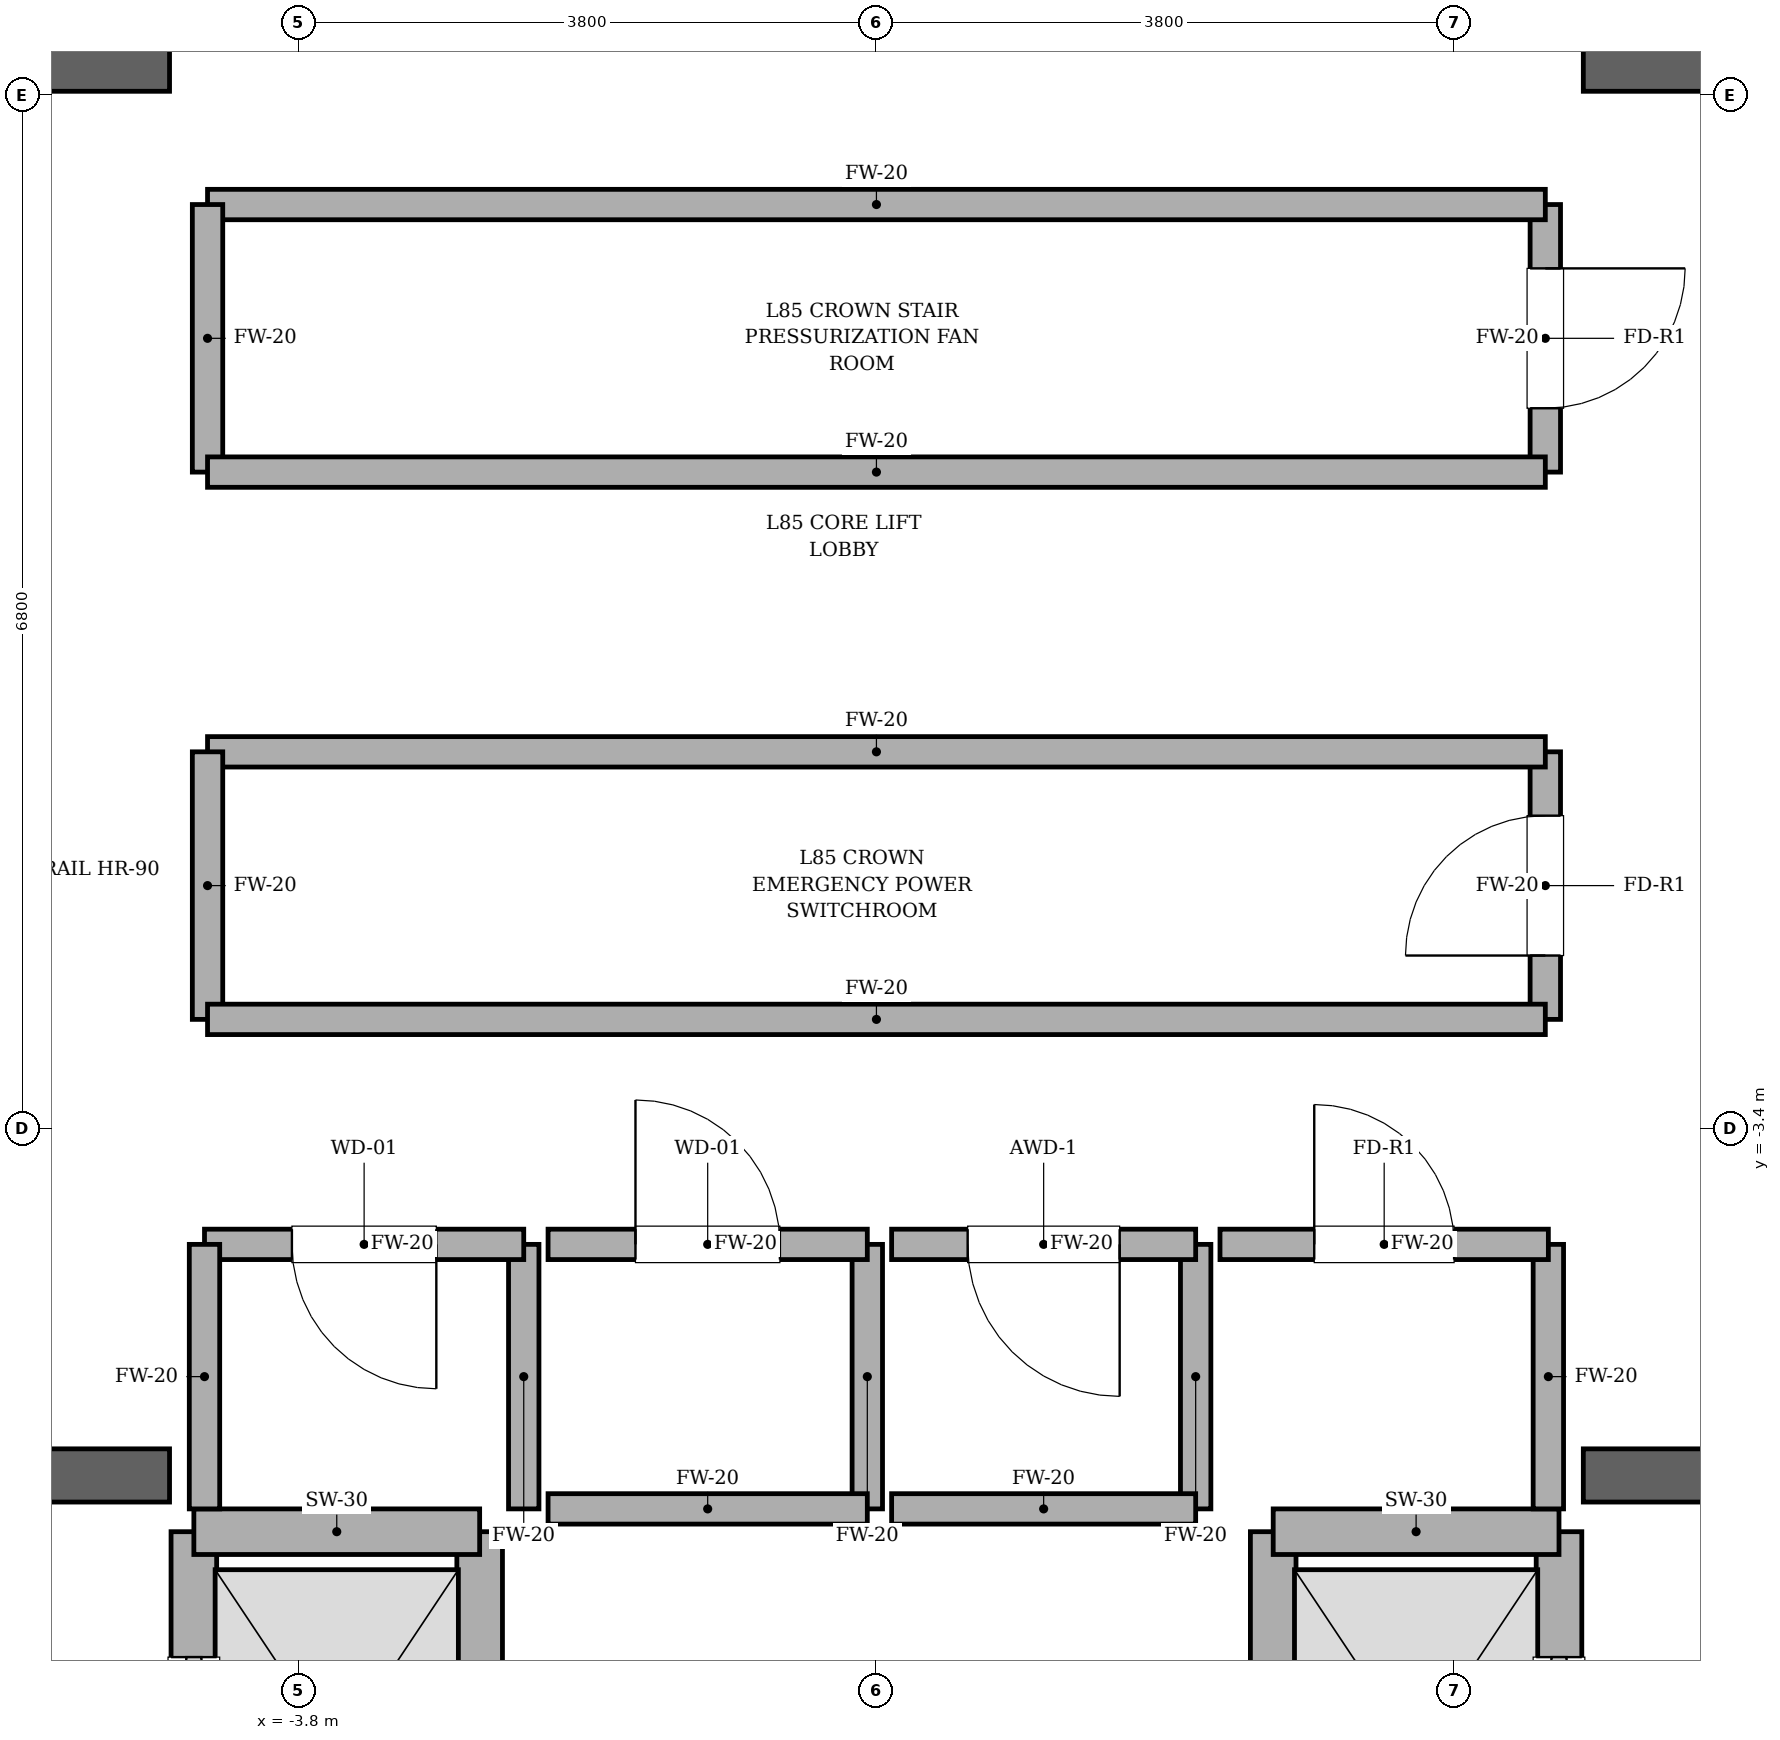
"""IFC4 building model, lengths in metres.
Left out: names, types, materials, properties, quantities, classifications, styles, units other than length and angle.
Written with IfcOpenShell. Run it as: python <this file> out.ifc"""

import sys

from ifc_helpers import new_model, si_unit, direction, frame, frame_2d, origin, place, context, subcontext, project, spatial, rectangle, extrude, element, fill, save


model = new_model("IFC4")
c1 = context("Model", 3, precision=1e-05, world=origin(), true_north=direction((0.0, 1.0)))
c2 = subcontext(c1, "Body", "Model", "MODEL_VIEW")
j1 = project(units=[si_unit("LENGTHUNIT", "METRE"), si_unit("PLANEANGLEUNIT", "RADIAN")], contexts=[c1])
p1 = place(None, origin())
s1 = spatial("IfcSite", under=j1, at=p1, CompositionType="ELEMENT")
p2 = place(p1, origin())
s2 = spatial("IfcBuilding", under=s1, at=p2, CompositionType="ELEMENT")
p3 = place(p2, frame((0.0, 0.0, 361.8)))
s3 = spatial("IfcBuildingStorey", under=s2, at=p3, CompositionType="ELEMENT", Elevation=361.8)
p4 = place(p3, frame((-9.975, -5.68, 0.0), z_axis=(0.0, 0.0, 1.0), x_axis=(1.0, 0.0, 0.0)))
e1 = element("IfcWall", 1, at=p4, inside=s3, PredefinedType="SOLIDWALL", context=c2, shape_type="SweptSolid", body=[
    extrude(rectangle(XDim=5.325, YDim=0.35, at=frame_2d((2.663, 0.0))), origin(), (0.0, 0.0, 1.0), 4.5),
])
p5 = place(p4, frame((1.435, 0.0, 0.0)))
e2 = element("IfcOpeningElement", 2, at=p5, cuts=e1, PredefinedType="OPENING", context=c2, shape_type="SweptSolid", body=[
    extrude(rectangle(XDim=1.18, YDim=2.2, at=frame_2d((0.59, 1.1))), frame((0.0, 0.185, 0.0), z_axis=(0.0, -1.0, 0.0), x_axis=(1.0, 0.0, 0.0)), (0.0, 0.0, 1.0), 0.37),
])
p6 = place(p3, frame((4.65, -5.68, 0.0), z_axis=(0.0, 0.0, 1.0), x_axis=(1.0, 0.0, 0.0)))
e3 = element("IfcWall", 3, at=p6, inside=s3, PredefinedType="SOLIDWALL", context=c2, shape_type="SweptSolid", body=[
    extrude(rectangle(XDim=5.325, YDim=0.35, at=frame_2d((2.663, 0.0))), origin(), (0.0, 0.0, 1.0), 4.5),
])
p7 = place(p6, frame((2.71, 0.0, 0.0)))
e4 = element("IfcOpeningElement", 4, at=p7, cuts=e3, PredefinedType="OPENING", context=c2, shape_type="SweptSolid", body=[
    extrude(rectangle(XDim=1.18, YDim=2.2, at=frame_2d((0.59, 1.1))), frame((0.0, 0.185, 0.0), z_axis=(0.0, -1.0, 0.0), x_axis=(1.0, 0.0, 0.0)), (0.0, 0.0, 1.0), 0.37),
])
for number, where, z_axis, x_axis in (
    (5, (-9.975, 3.6, 0.0), (0.0, 0.0, 1.0), (1.0, 0.0, 0.0)),
    (6, (4.65, 3.6, 0.0), (0.0, 0.0, 1.0), (1.0, 0.0, 0.0)),
):
    element("IfcWall", number, at=place(p3, frame(where, z_axis=z_axis, x_axis=x_axis)), inside=s3, PredefinedType="SOLIDWALL", context=c2, shape_type="SweptSolid", body=[
        extrude(rectangle(XDim=5.325, YDim=0.35, at=frame_2d((2.663, 0.0))), origin(), (0.0, 0.0, 1.0), 4.5),
    ])
p8 = place(p3, frame((-4.49, -8.82, 0.0), z_axis=(0.0, 0.0, 1.0), x_axis=(0.0, 1.0, 0.0)))
e7 = element("IfcWall", 7, at=p8, inside=s3, PredefinedType="SOLIDWALL", context=c2, shape_type="SweptSolid", body=[
    extrude(rectangle(XDim=2.77, YDim=0.3, at=frame_2d((1.385, 0.0))), origin(), (0.0, 0.0, 1.0), 4.28),
])
p9 = place(p8, frame((0.825, 0.0, 0.0)))
e8 = element("IfcOpeningElement", 8, at=p9, cuts=e7, PredefinedType="OPENING", context=c2, shape_type="SweptSolid", body=[
    extrude(rectangle(XDim=1.12, YDim=2.25, at=frame_2d((0.56, 1.125))), frame((0.0, 0.16, 0.0), z_axis=(0.0, -1.0, 0.0), x_axis=(1.0, 0.0, 0.0)), (0.0, 0.0, 1.0), 0.32),
])
p10 = place(p3, frame((-2.61, -8.82, 0.0), z_axis=(0.0, 0.0, 1.0), x_axis=(0.0, 1.0, 0.0)))
e9 = element("IfcWall", 9, at=p10, inside=s3, PredefinedType="SOLIDWALL", context=c2, shape_type="SweptSolid", body=[
    extrude(rectangle(XDim=2.77, YDim=0.3, at=frame_2d((1.385, 0.0))), origin(), (0.0, 0.0, 1.0), 4.28),
])
p11 = place(p3, frame((-4.49, -6.05, 0.0), z_axis=(0.0, 0.0, 1.0), x_axis=(1.0, 0.0, 0.0)))
e10 = element("IfcWall", 10, at=p11, inside=s3, PredefinedType="SOLIDWALL", context=c2, shape_type="SweptSolid", body=[
    extrude(rectangle(XDim=1.88, YDim=0.3, at=frame_2d((0.94, 0.0))), origin(), (0.0, 0.0, 1.0), 4.28),
])
p12 = place(p3, frame((4.49, -8.82, 0.0), z_axis=(0.0, 0.0, 1.0), x_axis=(0.0, 1.0, 0.0)))
e11 = element("IfcWall", 11, at=p12, inside=s3, PredefinedType="SOLIDWALL", context=c2, shape_type="SweptSolid", body=[
    extrude(rectangle(XDim=2.77, YDim=0.3, at=frame_2d((1.385, 0.0))), origin(), (0.0, 0.0, 1.0), 4.28),
])
p13 = place(p12, frame((0.825, 0.0, 0.0)))
e12 = element("IfcOpeningElement", 12, at=p13, cuts=e11, PredefinedType="OPENING", context=c2, shape_type="SweptSolid", body=[
    extrude(rectangle(XDim=1.12, YDim=2.25, at=frame_2d((0.56, 1.125))), frame((0.0, 0.16, 0.0), z_axis=(0.0, -1.0, 0.0), x_axis=(1.0, 0.0, 0.0)), (0.0, 0.0, 1.0), 0.32),
])
p14 = place(p3, frame((2.61, -8.82, 0.0), z_axis=(0.0, 0.0, 1.0), x_axis=(0.0, 1.0, 0.0)))
e13 = element("IfcWall", 13, at=p14, inside=s3, PredefinedType="SOLIDWALL", context=c2, shape_type="SweptSolid", body=[
    extrude(rectangle(XDim=2.77, YDim=0.3, at=frame_2d((1.385, 0.0))), origin(), (0.0, 0.0, 1.0), 4.28),
])
p15 = place(p3, frame((2.61, -6.05, 0.0), z_axis=(0.0, 0.0, 1.0), x_axis=(1.0, 0.0, 0.0)))
e14 = element("IfcWall", 14, at=p15, inside=s3, PredefinedType="SOLIDWALL", context=c2, shape_type="SweptSolid", body=[
    extrude(rectangle(XDim=1.88, YDim=0.3, at=frame_2d((0.94, 0.0))), origin(), (0.0, 0.0, 1.0), 4.28),
])
p16 = place(p3, frame((-2.32, -5.9, 0.0), z_axis=(0.0, 0.0, 1.0), x_axis=(0.0, 1.0, 0.0)))
e15 = element("IfcWall", 15, at=p16, inside=s3, PredefinedType="SOLIDWALL", context=c2, shape_type="SweptSolid", body=[
    extrude(rectangle(XDim=1.74, YDim=0.2, at=frame_2d((0.87, 0.0))), origin(), (0.0, 0.0, 1.0), 4.28),
])
p17 = place(p3, frame((-2.32, -4.16, 0.0), z_axis=(0.0, 0.0, 1.0), x_axis=(-1.0, 0.0, 0.0)))
e16 = element("IfcWall", 16, at=p17, inside=s3, PredefinedType="SOLIDWALL", context=c2, shape_type="SweptSolid", body=[
    extrude(rectangle(XDim=2.1, YDim=0.2, at=frame_2d((1.05, 0.0))), origin(), (0.0, 0.0, 1.0), 4.28),
])
p18 = place(p17, frame((0.575, 0.0, 0.0)))
e17 = element("IfcOpeningElement", 17, at=p18, cuts=e16, PredefinedType="OPENING", context=c2, shape_type="SweptSolid", body=[
    extrude(rectangle(XDim=0.95, YDim=2.15, at=frame_2d((0.475, 1.075))), frame((0.0, 0.11, 0.0), z_axis=(0.0, -1.0, 0.0), x_axis=(1.0, 0.0, 0.0)), (0.0, 0.0, 1.0), 0.22),
])
for number, where, z_axis, x_axis in (
    (18, (-4.42, -4.16, 0.0), (0.0, 0.0, 1.0), (0.0, -1.0, 0.0)),
    (19, (-0.06, -5.9, 0.0), (0.0, 0.0, 1.0), (0.0, 1.0, 0.0)),
):
    element("IfcWall", number, at=place(p3, frame(where, z_axis=z_axis, x_axis=x_axis)), inside=s3, PredefinedType="SOLIDWALL", context=c2, shape_type="SweptSolid", body=[
        extrude(rectangle(XDim=1.74, YDim=0.2, at=frame_2d((0.87, 0.0))), origin(), (0.0, 0.0, 1.0), 4.28),
    ])
p19 = place(p3, frame((-0.06, -4.16, 0.0), z_axis=(0.0, 0.0, 1.0), x_axis=(-1.0, 0.0, 0.0)))
e20 = element("IfcWall", 20, at=p19, inside=s3, PredefinedType="SOLIDWALL", context=c2, shape_type="SweptSolid", body=[
    extrude(rectangle(XDim=2.1, YDim=0.2, at=frame_2d((1.05, 0.0))), origin(), (0.0, 0.0, 1.0), 4.28),
])
p20 = place(p19, frame((0.575, 0.0, 0.0)))
e21 = element("IfcOpeningElement", 21, at=p20, cuts=e20, PredefinedType="OPENING", context=c2, shape_type="SweptSolid", body=[
    extrude(rectangle(XDim=0.95, YDim=2.15, at=frame_2d((0.475, 1.075))), frame((0.0, 0.11, 0.0), z_axis=(0.0, -1.0, 0.0), x_axis=(1.0, 0.0, 0.0)), (0.0, 0.0, 1.0), 0.22),
])
p21 = place(p3, frame((-2.16, -5.9, 0.0), z_axis=(0.0, 0.0, 1.0), x_axis=(1.0, 0.0, 0.0)))
e22 = element("IfcWall", 22, at=p21, inside=s3, PredefinedType="SOLIDWALL", context=c2, shape_type="SweptSolid", body=[
    extrude(rectangle(XDim=2.1, YDim=0.2, at=frame_2d((1.05, 0.0))), origin(), (0.0, 0.0, 1.0), 4.28),
])
p22 = place(p3, frame((2.1, -5.9, 0.0), z_axis=(0.0, 0.0, 1.0), x_axis=(0.0, 1.0, 0.0)))
e23 = element("IfcWall", 23, at=p22, inside=s3, PredefinedType="SOLIDWALL", context=c2, shape_type="SweptSolid", body=[
    extrude(rectangle(XDim=1.74, YDim=0.2, at=frame_2d((0.87, 0.0))), origin(), (0.0, 0.0, 1.0), 4.28),
])
p23 = place(p3, frame((2.1, -4.16, 0.0), z_axis=(0.0, 0.0, 1.0), x_axis=(-1.0, 0.0, 0.0)))
e24 = element("IfcWall", 24, at=p23, inside=s3, PredefinedType="SOLIDWALL", context=c2, shape_type="SweptSolid", body=[
    extrude(rectangle(XDim=2.0, YDim=0.2, at=frame_2d((1.0, 0.0))), origin(), (0.0, 0.0, 1.0), 4.28),
])
p24 = place(p23, frame((0.5, 0.0, 0.0)))
e25 = element("IfcOpeningElement", 25, at=p24, cuts=e24, PredefinedType="OPENING", context=c2, shape_type="SweptSolid", body=[
    extrude(rectangle(XDim=1.0, YDim=2.15, at=frame_2d((0.5, 1.075))), frame((0.0, 0.11, 0.0), z_axis=(0.0, -1.0, 0.0), x_axis=(1.0, 0.0, 0.0)), (0.0, 0.0, 1.0), 0.22),
])
p25 = place(p3, frame((0.1, -5.9, 0.0), z_axis=(0.0, 0.0, 1.0), x_axis=(1.0, 0.0, 0.0)))
e26 = element("IfcWall", 26, at=p25, inside=s3, PredefinedType="SOLIDWALL", context=c2, shape_type="SweptSolid", body=[
    extrude(rectangle(XDim=2.0, YDim=0.2, at=frame_2d((1.0, 0.0))), origin(), (0.0, 0.0, 1.0), 4.28),
])
p26 = place(p3, frame((4.42, -5.9, 0.0), z_axis=(0.0, 0.0, 1.0), x_axis=(0.0, 1.0, 0.0)))
e27 = element("IfcWall", 27, at=p26, inside=s3, PredefinedType="SOLIDWALL", context=c2, shape_type="SweptSolid", body=[
    extrude(rectangle(XDim=1.74, YDim=0.2, at=frame_2d((0.87, 0.0))), origin(), (0.0, 0.0, 1.0), 4.28),
])
p27 = place(p3, frame((4.42, -4.16, 0.0), z_axis=(0.0, 0.0, 1.0), x_axis=(-1.0, 0.0, 0.0)))
e28 = element("IfcWall", 28, at=p27, inside=s3, PredefinedType="SOLIDWALL", context=c2, shape_type="SweptSolid", body=[
    extrude(rectangle(XDim=2.16, YDim=0.2, at=frame_2d((1.08, 0.0))), origin(), (0.0, 0.0, 1.0), 4.28),
])
p28 = place(p27, frame((0.62, 0.0, 0.0)))
e29 = element("IfcOpeningElement", 29, at=p28, cuts=e28, PredefinedType="OPENING", context=c2, shape_type="SweptSolid", body=[
    extrude(rectangle(XDim=0.92, YDim=2.1, at=frame_2d((0.46, 1.05))), frame((0.0, 0.11, 0.0), z_axis=(0.0, -1.0, 0.0), x_axis=(1.0, 0.0, 0.0)), (0.0, 0.0, 1.0), 0.22),
])
p29 = place(p3, frame((4.4, -2.68, 0.0), z_axis=(0.0, 0.0, 1.0), x_axis=(0.0, 1.0, 0.0)))
e30 = element("IfcWall", 30, at=p29, inside=s3, PredefinedType="SOLIDWALL", context=c2, shape_type="SweptSolid", body=[
    extrude(rectangle(XDim=1.76, YDim=0.2, at=frame_2d((0.88, 0.0))), origin(), (0.0, 0.0, 1.0), 4.28),
])
p30 = place(p29, frame((0.42, 0.0, 0.0)))
e31 = element("IfcOpeningElement", 31, at=p30, cuts=e30, PredefinedType="OPENING", context=c2, shape_type="SweptSolid", body=[
    extrude(rectangle(XDim=0.92, YDim=2.1, at=frame_2d((0.46, 1.05))), frame((0.0, 0.11, 0.0), z_axis=(0.0, -1.0, 0.0), x_axis=(1.0, 0.0, 0.0)), (0.0, 0.0, 1.0), 0.22),
])
p31 = place(p3, frame((4.4, -0.92, 0.0), z_axis=(0.0, 0.0, 1.0), x_axis=(-1.0, 0.0, 0.0)))
e32 = element("IfcWall", 32, at=p31, inside=s3, PredefinedType="SOLIDWALL", context=c2, shape_type="SweptSolid", body=[
    extrude(rectangle(XDim=8.8, YDim=0.2, at=frame_2d((4.4, 0.0))), origin(), (0.0, 0.0, 1.0), 4.28),
])
p32 = place(p3, frame((-4.4, -0.92, 0.0), z_axis=(0.0, 0.0, 1.0), x_axis=(0.0, -1.0, 0.0)))
e33 = element("IfcWall", 33, at=p32, inside=s3, PredefinedType="SOLIDWALL", context=c2, shape_type="SweptSolid", body=[
    extrude(rectangle(XDim=1.76, YDim=0.2, at=frame_2d((0.88, 0.0))), origin(), (0.0, 0.0, 1.0), 4.28),
])
p33 = place(p3, frame((-4.4, -2.68, 0.0), z_axis=(0.0, 0.0, 1.0), x_axis=(1.0, 0.0, 0.0)))
e34 = element("IfcWall", 34, at=p33, inside=s3, PredefinedType="SOLIDWALL", context=c2, shape_type="SweptSolid", body=[
    extrude(rectangle(XDim=8.8, YDim=0.2, at=frame_2d((4.4, 0.0))), origin(), (0.0, 0.0, 1.0), 4.28),
])
p34 = place(p3, frame((4.4, 0.92, 0.0), z_axis=(0.0, 0.0, 1.0), x_axis=(0.0, 1.0, 0.0)))
e35 = element("IfcWall", 35, at=p34, inside=s3, PredefinedType="SOLIDWALL", context=c2, shape_type="SweptSolid", body=[
    extrude(rectangle(XDim=1.76, YDim=0.2, at=frame_2d((0.88, 0.0))), origin(), (0.0, 0.0, 1.0), 4.28),
])
p35 = place(p34, frame((0.42, 0.0, 0.0)))
e36 = element("IfcOpeningElement", 36, at=p35, cuts=e35, PredefinedType="OPENING", context=c2, shape_type="SweptSolid", body=[
    extrude(rectangle(XDim=0.92, YDim=2.1, at=frame_2d((0.46, 1.05))), frame((0.0, 0.11, 0.0), z_axis=(0.0, -1.0, 0.0), x_axis=(1.0, 0.0, 0.0)), (0.0, 0.0, 1.0), 0.22),
])
p36 = place(p3, frame((4.4, 2.68, 0.0), z_axis=(0.0, 0.0, 1.0), x_axis=(-1.0, 0.0, 0.0)))
e37 = element("IfcWall", 37, at=p36, inside=s3, PredefinedType="SOLIDWALL", context=c2, shape_type="SweptSolid", body=[
    extrude(rectangle(XDim=8.8, YDim=0.2, at=frame_2d((4.4, 0.0))), origin(), (0.0, 0.0, 1.0), 4.28),
])
p37 = place(p3, frame((-4.4, 2.68, 0.0), z_axis=(0.0, 0.0, 1.0), x_axis=(0.0, -1.0, 0.0)))
e38 = element("IfcWall", 38, at=p37, inside=s3, PredefinedType="SOLIDWALL", context=c2, shape_type="SweptSolid", body=[
    extrude(rectangle(XDim=1.76, YDim=0.2, at=frame_2d((0.88, 0.0))), origin(), (0.0, 0.0, 1.0), 4.28),
])
p38 = place(p3, frame((-4.4, 0.92, 0.0), z_axis=(0.0, 0.0, 1.0), x_axis=(1.0, 0.0, 0.0)))
e39 = element("IfcWall", 39, at=p38, inside=s3, PredefinedType="SOLIDWALL", context=c2, shape_type="SweptSolid", body=[
    extrude(rectangle(XDim=8.8, YDim=0.2, at=frame_2d((4.4, 0.0))), origin(), (0.0, 0.0, 1.0), 4.28),
])
p39 = place(p9, origin())
e40 = element("IfcDoor", 40, at=p39, inside=s3, OperationType="SLIDING_TO_LEFT", PredefinedType="DOOR", context=c2, shape_type="SweptSolid", body=[
    extrude(rectangle(XDim=1.12, YDim=2.25, at=frame_2d((0.56, 1.125))), frame((0.0, 0.025, 0.0), z_axis=(0.0, -1.0, 0.0), x_axis=(1.0, 0.0, 0.0)), (0.0, 0.0, 1.0), 0.05),
])
fill(e8, e40)
p40 = place(p13, origin())
e41 = element("IfcDoor", 41, at=p40, inside=s3, OperationType="SLIDING_TO_RIGHT", PredefinedType="DOOR", context=c2, shape_type="SweptSolid", body=[
    extrude(rectangle(XDim=1.12, YDim=2.25, at=frame_2d((0.56, 1.125))), frame((0.0, 0.025, 0.0), z_axis=(0.0, -1.0, 0.0), x_axis=(1.0, 0.0, 0.0)), (0.0, 0.0, 1.0), 0.05),
])
fill(e12, e41)
p41 = place(p18, origin())
e42 = element("IfcDoor", 42, at=p41, inside=s3, OperationType="SINGLE_SWING_LEFT", PredefinedType="DOOR", context=c2, shape_type="SweptSolid", body=[
    extrude(rectangle(XDim=0.95, YDim=2.15, at=frame_2d((0.475, 1.075))), frame((0.0, 0.025, 0.0), z_axis=(0.0, -1.0, 0.0), x_axis=(1.0, 0.0, 0.0)), (0.0, 0.0, 1.0), 0.05),
])
fill(e17, e42)
p42 = place(p20, origin())
e43 = element("IfcDoor", 43, at=p42, inside=s3, OperationType="SINGLE_SWING_RIGHT", PredefinedType="DOOR", context=c2, shape_type="SweptSolid", body=[
    extrude(rectangle(XDim=0.95, YDim=2.15, at=frame_2d((0.475, 1.075))), frame((0.0, 0.025, 0.0), z_axis=(0.0, -1.0, 0.0), x_axis=(1.0, 0.0, 0.0)), (0.0, 0.0, 1.0), 0.05),
])
fill(e21, e43)
p43 = place(p24, origin())
e44 = element("IfcDoor", 44, at=p43, inside=s3, OperationType="SINGLE_SWING_LEFT", PredefinedType="DOOR", context=c2, shape_type="SweptSolid", body=[
    extrude(rectangle(XDim=1.0, YDim=2.15, at=frame_2d((0.5, 1.075))), frame((0.0, 0.025, 0.0), z_axis=(0.0, -1.0, 0.0), x_axis=(1.0, 0.0, 0.0)), (0.0, 0.0, 1.0), 0.05),
])
fill(e25, e44)
p44 = place(p28, origin())
e45 = element("IfcDoor", 45, at=p44, inside=s3, OperationType="SINGLE_SWING_RIGHT", PredefinedType="DOOR", context=c2, shape_type="SweptSolid", body=[
    extrude(rectangle(XDim=0.92, YDim=2.1, at=frame_2d((0.46, 1.05))), frame((0.0, 0.025, 0.0), z_axis=(0.0, -1.0, 0.0), x_axis=(1.0, 0.0, 0.0)), (0.0, 0.0, 1.0), 0.05),
])
fill(e29, e45)
p45 = place(p30, origin())
e46 = element("IfcDoor", 46, at=p45, inside=s3, OperationType="SINGLE_SWING_LEFT", PredefinedType="DOOR", context=c2, shape_type="SweptSolid", body=[
    extrude(rectangle(XDim=0.92, YDim=2.1, at=frame_2d((0.46, 1.05))), frame((0.0, 0.025, 0.0), z_axis=(0.0, -1.0, 0.0), x_axis=(1.0, 0.0, 0.0)), (0.0, 0.0, 1.0), 0.05),
])
fill(e31, e46)
p46 = place(p35, origin())
e47 = element("IfcDoor", 47, at=p46, inside=s3, OperationType="SINGLE_SWING_RIGHT", PredefinedType="DOOR", context=c2, shape_type="SweptSolid", body=[
    extrude(rectangle(XDim=0.92, YDim=2.1, at=frame_2d((0.46, 1.05))), frame((0.0, 0.025, 0.0), z_axis=(0.0, -1.0, 0.0), x_axis=(1.0, 0.0, 0.0)), (0.0, 0.0, 1.0), 0.05),
])
fill(e36, e47)
save(model, sys.argv[1])
